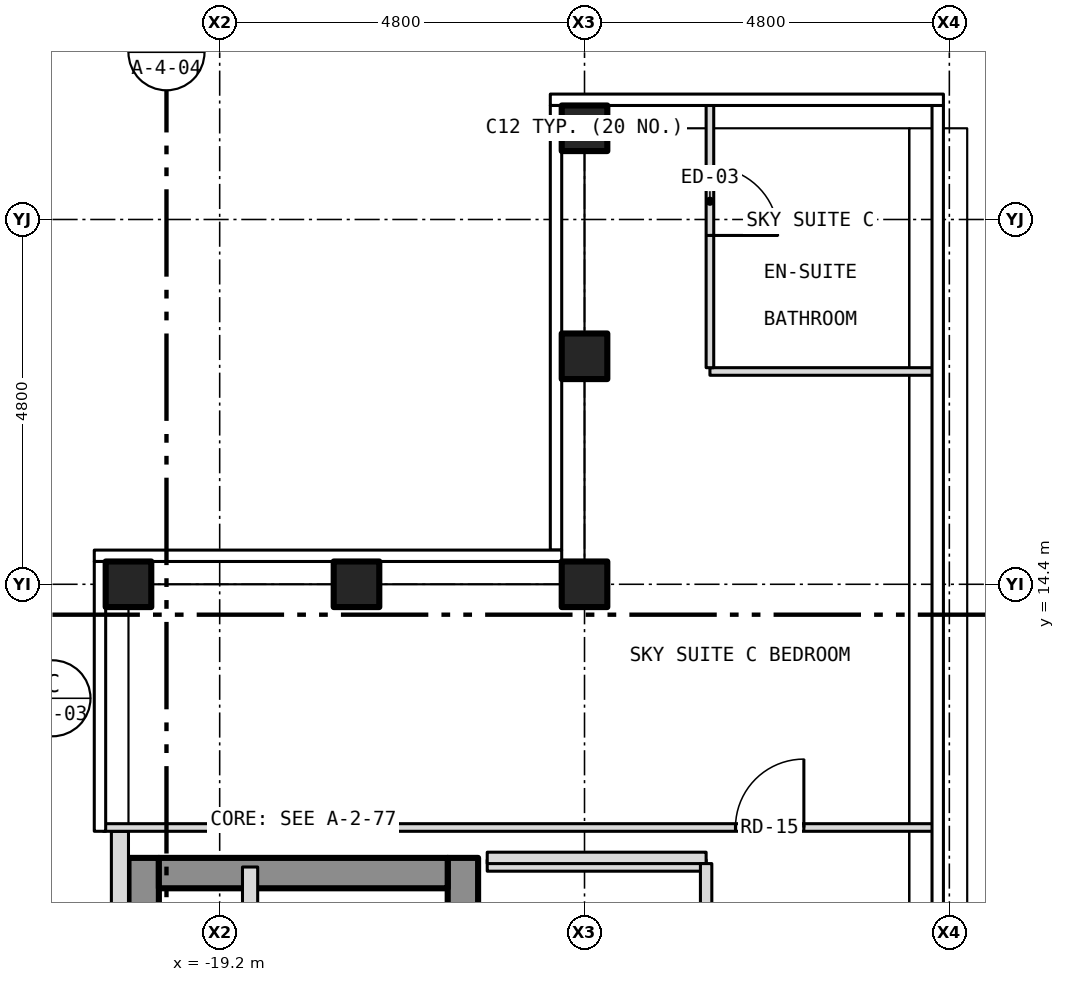
"""IFC4 building model, lengths in metres.
Left out: names, types, materials, properties, quantities, classifications, styles, units other than length and angle.
Written with IfcOpenShell. Run it as: python <this file> out.ifc"""

import sys

from ifc_helpers import new_model, si_unit, direction, frame, frame_2d, origin, origin_2d, place, context, subcontext, project, spatial, rectangle, hollow_rectangle, extrude, element, fill, save


model = new_model("IFC4")
c1 = context("Model", 3, precision=1e-05, world=origin(), true_north=direction((0.0, 1.0)))
c2 = subcontext(c1, "Body", "Model", "MODEL_VIEW")
j1 = project(units=[si_unit("LENGTHUNIT", "METRE"), si_unit("PLANEANGLEUNIT", "RADIAN")], contexts=[c1])
p1 = place(None, origin())
s1 = spatial("IfcSite", under=j1, at=p1, CompositionType="ELEMENT")
p2 = place(p1, origin())
s2 = spatial("IfcBuilding", under=s1, at=p2, CompositionType="ELEMENT")
p3 = place(p2, frame((0.0, 0.0, 279.5)))
s3 = spatial("IfcBuildingStorey", under=s2, at=p3, CompositionType="ELEMENT", Elevation=279.5)
for number, where, z_axis, x_axis in (
    (1, (-14.4, 20.4, -0.15), (0.0, 0.0, 1.0), (1.0, 0.0, 0.0)),
    (2, (-20.4, 14.4, -0.15), (0.0, 0.0, 1.0), (1.0, 0.0, 0.0)),
    (3, (-14.4, 14.4, -0.15), (0.0, 0.0, 1.0), (1.0, 0.0, 0.0)),
    (4, (-14.4, 17.4, -0.15), (0.0, 0.0, 1.0), (1.0, 0.0, 0.0)),
    (5, (-17.4, 14.4, -0.15), (0.0, 0.0, 1.0), (1.0, 0.0, 0.0)),
):
    element("IfcColumn", number, at=place(p3, frame(where, z_axis=z_axis, x_axis=x_axis)), inside=s3, PredefinedType="COLUMN", context=c2, shape_type="SweptSolid", body=[
        extrude(hollow_rectangle(XDim=0.6, YDim=0.6, WallThickness=0.03, at=origin_2d()), origin(), (0.0, 0.0, 1.0), 3.5),
    ])
p4 = place(p3, frame((-16.0, -10.8, 0.0), z_axis=(0.0, 0.0, 1.0), x_axis=(0.0, 1.0, 0.0)))
e6 = element("IfcWall", 6, at=p4, inside=s3, PredefinedType="SHEAR", context=c2, shape_type="SweptSolid", body=[
    extrude(rectangle(XDim=21.6, YDim=0.4, at=frame_2d((10.8, 0.0))), origin(), (0.0, 0.0, 1.0), 3.25),
])
p5 = place(p4, frame((9.4, 0.0, 0.0)))
e7 = element("IfcOpeningElement", 7, at=p5, cuts=e6, PredefinedType="OPENING", context=c2, shape_type="SweptSolid", body=[
    extrude(rectangle(XDim=1.1, YDim=2.1, at=frame_2d((0.55, 1.05))), frame((0.0, 0.212, 0.0), z_axis=(0.0, -1.0, 0.0), x_axis=(1.0, 0.0, 0.0)), (0.0, 0.0, 1.0), 0.424),
])
p6 = place(p4, frame((11.5, 0.0, 0.0)))
e8 = element("IfcOpeningElement", 8, at=p6, cuts=e6, PredefinedType="OPENING", context=c2, shape_type="SweptSolid", body=[
    extrude(rectangle(XDim=1.1, YDim=2.1, at=frame_2d((0.55, 1.05))), frame((0.0, 0.212, 0.0), z_axis=(0.0, -1.0, 0.0), x_axis=(1.0, 0.0, 0.0)), (0.0, 0.0, 1.0), 0.424),
])
p7 = place(p4, frame((13.6, 0.0, 0.0)))
e9 = element("IfcOpeningElement", 9, at=p7, cuts=e6, PredefinedType="OPENING", context=c2, shape_type="SweptSolid", body=[
    extrude(rectangle(XDim=1.1, YDim=2.1, at=frame_2d((0.55, 1.05))), frame((0.0, 0.212, 0.0), z_axis=(0.0, -1.0, 0.0), x_axis=(1.0, 0.0, 0.0)), (0.0, 0.0, 1.0), 0.424),
])
p8 = place(p4, frame((15.7, 0.0, 0.0)))
e10 = element("IfcOpeningElement", 10, at=p8, cuts=e6, PredefinedType="OPENING", context=c2, shape_type="SweptSolid", body=[
    extrude(rectangle(XDim=1.1, YDim=2.1, at=frame_2d((0.55, 1.05))), frame((0.0, 0.212, 0.0), z_axis=(0.0, -1.0, 0.0), x_axis=(1.0, 0.0, 0.0)), (0.0, 0.0, 1.0), 0.424),
])
p9 = place(p4, frame((17.8, 0.0, 0.0)))
e11 = element("IfcOpeningElement", 11, at=p9, cuts=e6, PredefinedType="OPENING", context=c2, shape_type="SweptSolid", body=[
    extrude(rectangle(XDim=1.1, YDim=2.1, at=frame_2d((0.55, 1.05))), frame((0.0, 0.212, 0.0), z_axis=(0.0, -1.0, 0.0), x_axis=(1.0, 0.0, 0.0)), (0.0, 0.0, 1.0), 0.424),
])
p10 = place(p4, frame((0.458, 0.0, 0.0)))
e12 = element("IfcOpeningElement", 12, at=p10, cuts=e6, PredefinedType="OPENING", context=c2, shape_type="SweptSolid", body=[
    extrude(rectangle(XDim=1.1, YDim=2.1, at=frame_2d((0.55, 1.05))), frame((0.0, 0.212, 0.0), z_axis=(0.0, -1.0, 0.0), x_axis=(1.0, 0.0, 0.0)), (0.0, 0.0, 1.0), 0.424),
])
p11 = place(p4, frame((7.5, 0.0, 0.0)))
e13 = element("IfcOpeningElement", 13, at=p11, cuts=e6, PredefinedType="OPENING", context=c2, shape_type="SweptSolid", body=[
    extrude(rectangle(XDim=1.1, YDim=2.1, at=frame_2d((0.55, 1.05))), frame((0.0, 0.212, 0.0), z_axis=(0.0, -1.0, 0.0), x_axis=(1.0, 0.0, 0.0)), (0.0, 0.0, 1.0), 0.424),
])
p12 = place(p4, frame((20.0, 0.0, 0.0)))
e14 = element("IfcOpeningElement", 14, at=p12, cuts=e6, PredefinedType="OPENING", context=c2, shape_type="SweptSolid", body=[
    extrude(rectangle(XDim=0.9, YDim=2.1, at=frame_2d((0.45, 1.05))), frame((0.0, 0.212, 0.0), z_axis=(0.0, -1.0, 0.0), x_axis=(1.0, 0.0, 0.0)), (0.0, 0.0, 1.0), 0.424),
])
p13 = place(p3, frame((-20.2, -10.8, 0.0), z_axis=(0.0, 0.0, 1.0), x_axis=(0.0, 1.0, 0.0)))
e15 = element("IfcWall", 15, at=p13, inside=s3, PredefinedType="SHEAR", context=c2, shape_type="SweptSolid", body=[
    extrude(rectangle(XDim=21.6, YDim=0.4, at=frame_2d((10.8, 0.0))), origin(), (0.0, 0.0, 1.0), 3.25),
])
p14 = place(p3, frame((-20.0, 10.6, 0.0), z_axis=(0.0, 0.0, 1.0), x_axis=(1.0, 0.0, 0.0)))
e16 = element("IfcWall", 16, at=p14, inside=s3, PredefinedType="SHEAR", context=c2, shape_type="SweptSolid", body=[
    extrude(rectangle(XDim=3.8, YDim=0.4, at=frame_2d((1.9, 0.0))), origin(), (0.0, 0.0, 1.0), 3.25),
])
p15 = place(p3, frame((-20.512, 11.15, 0.0), z_axis=(0.0, 0.0, 1.0), x_axis=(0.0, -1.0, 0.0)))
e17 = element("IfcWall", 17, at=p15, inside=s3, PredefinedType="SOLIDWALL", context=c2, shape_type="SweptSolid", body=[
    extrude(rectangle(XDim=22.3, YDim=0.225, at=frame_2d((11.15, 0.0))), origin(), (0.0, 0.0, 1.0), 3.5),
])
p16 = place(p15, frame((18.4, 0.0, 1.0)))
e18 = element("IfcOpeningElement", 18, at=p16, cuts=e17, PredefinedType="OPENING", context=c2, shape_type="SweptSolid", body=[
    extrude(rectangle(XDim=0.6, YDim=1.5, at=frame_2d((0.3, 0.75))), frame((0.0, 0.125, 0.0), z_axis=(0.0, -1.0, 0.0), x_axis=(1.0, 0.0, 0.0)), (0.0, 0.0, 1.0), 0.249),
])
for number, where, z_axis, x_axis in (
    (19, (-15.68, 10.7, 0.0), (0.0, 0.0, 1.0), (1.0, 0.0, 0.0)),
    (20, (-15.68, 10.8, 0.0), (0.0, 0.0, 1.0), (1.0, 0.0, 0.0)),
):
    element("IfcWall", number, at=place(p3, frame(where, z_axis=z_axis, x_axis=x_axis)), inside=s3, PredefinedType="PARTITIONING", context=c2, shape_type="SweptSolid", body=[
        extrude(rectangle(XDim=2.88, YDim=0.15, at=frame_2d((1.44, 0.0))), origin(), (0.0, 0.0, 1.0), 3.35),
    ])
p17 = place(p3, frame((-20.73, 11.2, 0.0), z_axis=(0.0, 0.0, 1.0), x_axis=(1.0, 0.0, 0.0)))
e21 = element("IfcWall", 21, at=p17, inside=s3, PredefinedType="PARTITIONING", context=c2, shape_type="SweptSolid", body=[
    extrude(rectangle(XDim=10.932, YDim=0.1, at=frame_2d((5.466, 0.0))), origin(), (0.0, 0.0, 1.0), 3.35),
])
p18 = place(p17, frame((8.316, 0.0, 0.0)))
e22 = element("IfcOpeningElement", 22, at=p18, cuts=e21, PredefinedType="OPENING", context=c2, shape_type="SweptSolid", body=[
    extrude(rectangle(XDim=0.9, YDim=2.1, at=frame_2d((0.45, 1.05))), frame((0.0, 0.062, 0.0), z_axis=(0.0, -1.0, 0.0), x_axis=(1.0, 0.0, 0.0)), (0.0, 0.0, 1.0), 0.124),
])
p19 = place(p3, frame((-12.75, 17.2, 0.0), z_axis=(0.0, 0.0, 1.0), x_axis=(1.0, 0.0, 0.0)))
e23 = element("IfcWall", 23, at=p19, inside=s3, PredefinedType="PARTITIONING", context=c2, shape_type="SweptSolid", body=[
    extrude(rectangle(XDim=2.952, YDim=0.1, at=frame_2d((1.476, 0.0))), origin(), (0.0, 0.0, 1.0), 3.35),
])
p20 = place(p3, frame((-18.8, 4.5, 0.0), z_axis=(0.0, 0.0, 1.0), x_axis=(0.0, 1.0, 0.0)))
e24 = element("IfcWall", 24, at=p20, inside=s3, PredefinedType="PARTITIONING", context=c2, shape_type="SweptSolid", body=[
    extrude(rectangle(XDim=6.18, YDim=0.2, at=frame_2d((3.09, 0.0))), origin(), (0.0, 0.0, 1.0), 3.25),
])
p21 = place(p3, frame((-12.8, 2.4, 0.0), z_axis=(0.0, 0.0, 1.0), x_axis=(0.0, 1.0, 0.0)))
e25 = element("IfcWall", 25, at=p21, inside=s3, PredefinedType="PARTITIONING", context=c2, shape_type="SweptSolid", body=[
    extrude(rectangle(XDim=8.325, YDim=0.15, at=frame_2d((4.163, 0.0))), origin(), (0.0, 0.0, 1.0), 3.35),
])
p22 = place(p21, frame((5.585, 0.0, 0.0)))
e26 = element("IfcOpeningElement", 26, at=p22, cuts=e25, PredefinedType="OPENING", context=c2, shape_type="SweptSolid", body=[
    extrude(rectangle(XDim=0.9, YDim=2.1, at=frame_2d((0.45, 1.05))), frame((0.0, 0.087, 0.0), z_axis=(0.0, -1.0, 0.0), x_axis=(1.0, 0.0, 0.0)), (0.0, 0.0, 1.0), 0.174),
])
p23 = place(p3, frame((-12.75, 17.25, 0.0), z_axis=(0.0, 0.0, 1.0), x_axis=(0.0, 1.0, 0.0)))
e27 = element("IfcWall", 27, at=p23, inside=s3, PredefinedType="PARTITIONING", context=c2, shape_type="SweptSolid", body=[
    extrude(rectangle(XDim=3.48, YDim=0.1, at=frame_2d((1.74, 0.0))), origin(), (0.0, 0.0, 1.0), 3.35),
])
p24 = place(p23, frame((1.74, 0.0, 0.0)))
e28 = element("IfcOpeningElement", 28, at=p24, cuts=e27, PredefinedType="OPENING", context=c2, shape_type="SweptSolid", body=[
    extrude(rectangle(XDim=0.9, YDim=2.1, at=frame_2d((0.45, 1.05))), frame((0.0, 0.062, 0.0), z_axis=(0.0, -1.0, 0.0), x_axis=(1.0, 0.0, 0.0)), (0.0, 0.0, 1.0), 0.124),
])
p25 = place(p18, origin())
e29 = element("IfcDoor", 29, at=p25, inside=s3, OperationType="SINGLE_SWING_RIGHT", PredefinedType="DOOR", context=c2, shape_type="SweptSolid", body=[
    extrude(rectangle(XDim=0.9, YDim=2.1, at=frame_2d((0.45, 1.05))), frame((0.0, 0.025, 0.0), z_axis=(0.0, -1.0, 0.0), x_axis=(1.0, 0.0, 0.0)), (0.0, 0.0, 1.0), 0.05),
])
fill(e22, e29)
p26 = place(p24, origin())
e30 = element("IfcDoor", 30, at=p26, inside=s3, OperationType="SINGLE_SWING_LEFT", PredefinedType="DOOR", context=c2, shape_type="SweptSolid", body=[
    extrude(rectangle(XDim=0.9, YDim=2.1, at=frame_2d((0.45, 1.05))), frame((0.0, 0.025, 0.0), z_axis=(0.0, -1.0, 0.0), x_axis=(1.0, 0.0, 0.0)), (0.0, 0.0, 1.0), 0.05),
])
fill(e28, e30)
save(model, sys.argv[1])
